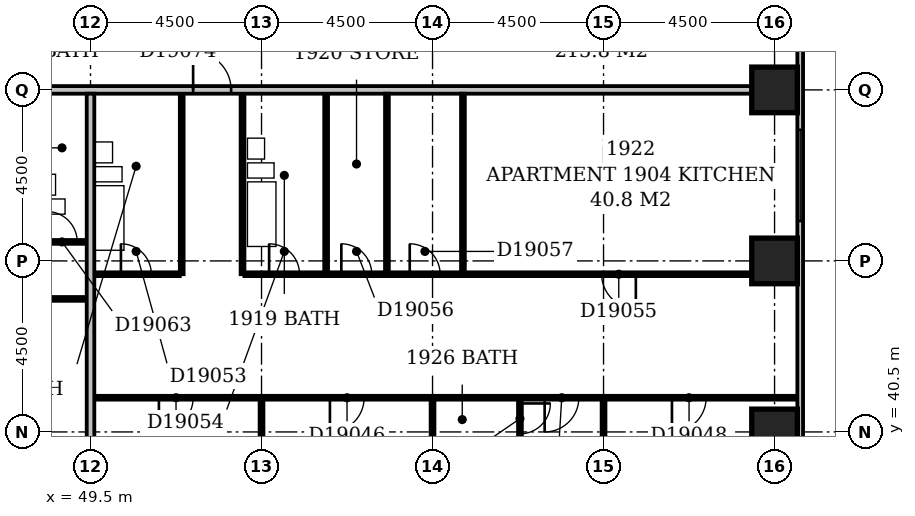
"""IFC4 building model, lengths in metres.
Left out: names, types, materials, properties, quantities, classifications, styles, units other than length and angle.
Written with IfcOpenShell. Run it as: python <this file> out.ifc"""

import sys

from ifc_helpers import new_model, si_unit, direction, frame, frame_2d, origin, origin_2d, place, context, subcontext, project, spatial, rectangle, extrude, element, fill, save


model = new_model("IFC4")
c1 = context("Model", 3, precision=1e-05, world=origin(), true_north=direction((0.0, 1.0)))
c2 = subcontext(c1, "Body", "Model", "MODEL_VIEW")
j1 = project(units=[si_unit("LENGTHUNIT", "METRE"), si_unit("PLANEANGLEUNIT", "RADIAN")], contexts=[c1])
p1 = place(None, origin())
s1 = spatial("IfcSite", under=j1, at=p1, CompositionType="ELEMENT")
p2 = place(p1, origin())
s2 = spatial("IfcBuilding", under=s1, at=p2, CompositionType="ELEMENT")
p3 = place(p2, frame((0.0, 0.0, 79.4)))
s3 = spatial("IfcBuildingStorey", under=s2, at=p3, CompositionType="ELEMENT", Elevation=79.4)
for number, where, z_axis, x_axis in (
    (1, (67.5, 40.5, -0.3), (0.0, 0.0, 1.0), (1.0, 0.0, 0.0)),
    (2, (67.5, 45.0, -0.3), (0.0, 0.0, 1.0), (1.0, 0.0, 0.0)),
    (3, (67.5, 49.5, -0.3), (0.0, 0.0, 1.0), (1.0, 0.0, 0.0)),
):
    element("IfcColumn", number, at=place(p3, frame(where, z_axis=z_axis, x_axis=x_axis)), inside=s3, PredefinedType="COLUMN", context=c2, shape_type="SweptSolid", body=[
        extrude(rectangle(XDim=1.2, YDim=1.2, at=origin_2d()), origin(), (0.0, 0.0, 1.0), 3.6),
    ])
p4 = place(p3, frame((68.175, 35.4, 0.0), z_axis=(0.0, 0.0, 1.0), x_axis=(0.0, 1.0, 0.0)))
e4 = element("IfcWall", 4, at=p4, inside=s3, PredefinedType="STANDARD", context=c2, shape_type="SweptSolid", body=[
    extrude(rectangle(XDim=23.85, YDim=0.15, at=frame_2d((11.925, 0.0))), origin(), (0.0, 0.0, 1.0), 2.7),
])
p5 = place(p4, frame((1.65, 0.0, 0.6)))
e5 = element("IfcOpeningElement", 5, at=p5, cuts=e4, PredefinedType="OPENING", context=c2, shape_type="SweptSolid", body=[
    extrude(rectangle(XDim=2.4, YDim=1.8, at=frame_2d((1.2, 0.9))), frame((0.0, 0.087, 0.0), z_axis=(0.0, -1.0, 0.0), x_axis=(1.0, 0.0, 0.0)), (0.0, 0.0, 1.0), 0.174),
])
p6 = place(p4, frame((10.65, 0.0, 0.6)))
e6 = element("IfcOpeningElement", 6, at=p6, cuts=e4, PredefinedType="OPENING", context=c2, shape_type="SweptSolid", body=[
    extrude(rectangle(XDim=2.4, YDim=1.8, at=frame_2d((1.2, 0.9))), frame((0.0, 0.087, 0.0), z_axis=(0.0, -1.0, 0.0), x_axis=(1.0, 0.0, 0.0)), (0.0, 0.0, 1.0), 0.174),
])
p7 = place(p4, frame((19.65, 0.0, 0.6)))
e7 = element("IfcOpeningElement", 7, at=p7, cuts=e4, PredefinedType="OPENING", context=c2, shape_type="SweptSolid", body=[
    extrude(rectangle(XDim=2.4, YDim=1.8, at=frame_2d((1.2, 0.9))), frame((0.0, 0.087, 0.0), z_axis=(0.0, -1.0, 0.0), x_axis=(1.0, 0.0, 0.0)), (0.0, 0.0, 1.0), 0.174),
])
p8 = place(p3, frame((49.5, 36.6, 0.0), z_axis=(0.0, 0.0, 1.0), x_axis=(0.0, 1.0, 0.0)))
e8 = element("IfcWall", 8, at=p8, inside=s3, PredefinedType="PARTITIONING", context=c2, shape_type="SweptSolid", body=[
    extrude(rectangle(XDim=12.8, YDim=0.2, at=frame_2d((6.4, 0.0))), origin(), (0.0, 0.0, 1.0), 3.3),
])
p9 = place(p3, frame((54.0, 36.6, 0.0), z_axis=(0.0, 0.0, 1.0), x_axis=(0.0, 1.0, 0.0)))
e9 = element("IfcWall", 9, at=p9, inside=s3, PredefinedType="PARTITIONING", context=c2, shape_type="SweptSolid", body=[
    extrude(rectangle(XDim=4.75, YDim=0.1, at=frame_2d((2.375, 0.0))), origin(), (0.0, 0.0, 1.0), 2.6),
])
p10 = place(p3, frame((58.5, 36.6, 0.0), z_axis=(0.0, 0.0, 1.0), x_axis=(0.0, 1.0, 0.0)))
e10 = element("IfcWall", 10, at=p10, inside=s3, PredefinedType="PARTITIONING", context=c2, shape_type="SweptSolid", body=[
    extrude(rectangle(XDim=4.75, YDim=0.1, at=frame_2d((2.375, 0.0))), origin(), (0.0, 0.0, 1.0), 3.3),
])
p11 = place(p3, frame((63.0, 36.6, 0.0), z_axis=(0.0, 0.0, 1.0), x_axis=(0.0, 1.0, 0.0)))
e11 = element("IfcWall", 11, at=p11, inside=s3, PredefinedType="PARTITIONING", context=c2, shape_type="SweptSolid", body=[
    extrude(rectangle(XDim=4.75, YDim=0.1, at=frame_2d((2.375, 0.0))), origin(), (0.0, 0.0, 1.0), 2.4),
])
p12 = place(p3, frame((60.8, 40.25, 0.0), z_axis=(0.0, 0.0, 1.0), x_axis=(0.0, 1.0, 0.0)))
e12 = element("IfcWall", 12, at=p12, inside=s3, PredefinedType="PLUMBINGWALL", context=c2, shape_type="SweptSolid", body=[
    extrude(rectangle(XDim=1.1, YDim=0.1, at=frame_2d((0.55, 0.0))), origin(), (0.0, 0.0, 1.0), 3.3),
])
p13 = place(p12, frame((0.2, 0.0, 0.0)))
e13 = element("IfcOpeningElement", 13, at=p13, cuts=e12, PredefinedType="OPENING", context=c2, shape_type="SweptSolid", body=[
    extrude(rectangle(XDim=0.8, YDim=2.1, at=frame_2d((0.4, 1.05))), frame((0.0, 0.062, 0.0), z_axis=(0.0, -1.0, 0.0), x_axis=(1.0, 0.0, 0.0)), (0.0, 0.0, 1.0), 0.124),
])
p14 = place(p3, frame((49.6, 41.4, 0.0), z_axis=(0.0, 0.0, 1.0), x_axis=(1.0, 0.0, 0.0)))
e14 = element("IfcWall", 14, at=p14, inside=s3, PredefinedType="PARTITIONING", context=c2, shape_type="SweptSolid", body=[
    extrude(rectangle(XDim=18.5, YDim=0.1, at=frame_2d((9.25, 0.0))), origin(), (0.0, 0.0, 1.0), 3.3),
])
p15 = place(p14, frame((1.7, 0.0, 0.0)))
e15 = element("IfcOpeningElement", 15, at=p15, cuts=e14, PredefinedType="OPENING", context=c2, shape_type="SweptSolid", body=[
    extrude(rectangle(XDim=0.9, YDim=2.1, at=frame_2d((0.45, 1.05))), frame((0.0, 0.062, 0.0), z_axis=(0.0, -1.0, 0.0), x_axis=(1.0, 0.0, 0.0)), (0.0, 0.0, 1.0), 0.124),
])
p16 = place(p14, frame((6.2, 0.0, 0.0)))
e16 = element("IfcOpeningElement", 16, at=p16, cuts=e14, PredefinedType="OPENING", context=c2, shape_type="SweptSolid", body=[
    extrude(rectangle(XDim=0.9, YDim=2.1, at=frame_2d((0.45, 1.05))), frame((0.0, 0.062, 0.0), z_axis=(0.0, -1.0, 0.0), x_axis=(1.0, 0.0, 0.0)), (0.0, 0.0, 1.0), 0.124),
])
p17 = place(p14, frame((11.85, 0.0, 0.0)))
e17 = element("IfcOpeningElement", 17, at=p17, cuts=e14, PredefinedType="OPENING", context=c2, shape_type="SweptSolid", body=[
    extrude(rectangle(XDim=0.9, YDim=2.1, at=frame_2d((0.45, 1.05))), frame((0.0, 0.062, 0.0), z_axis=(0.0, -1.0, 0.0), x_axis=(1.0, 0.0, 0.0)), (0.0, 0.0, 1.0), 0.124),
])
p18 = place(p14, frame((15.2, 0.0, 0.0)))
e18 = element("IfcOpeningElement", 18, at=p18, cuts=e14, PredefinedType="OPENING", context=c2, shape_type="SweptSolid", body=[
    extrude(rectangle(XDim=0.9, YDim=2.1, at=frame_2d((0.45, 1.05))), frame((0.0, 0.062, 0.0), z_axis=(0.0, -1.0, 0.0), x_axis=(1.0, 0.0, 0.0)), (0.0, 0.0, 1.0), 0.124),
])
p19 = place(p3, frame((36.1, 44.0, 0.0), z_axis=(0.0, 0.0, 1.0), x_axis=(1.0, 0.0, 0.0)))
e19 = element("IfcWall", 19, at=p19, inside=s3, PredefinedType="PARTITIONING", context=c2, shape_type="SweptSolid", body=[
    extrude(rectangle(XDim=13.3, YDim=0.1, at=frame_2d((6.65, 0.0))), origin(), (0.0, 0.0, 1.0), 3.3),
])
p20 = place(p19, frame((3.9, 0.0, 0.0)))
e20 = element("IfcOpeningElement", 20, at=p20, cuts=e19, PredefinedType="OPENING", context=c2, shape_type="SweptSolid", body=[
    extrude(rectangle(XDim=0.9, YDim=2.1, at=frame_2d((0.45, 1.05))), frame((0.0, 0.062, 0.0), z_axis=(0.0, -1.0, 0.0), x_axis=(1.0, 0.0, 0.0)), (0.0, 0.0, 1.0), 0.124),
])
p21 = place(p19, frame((10.7, 0.0, 0.0)))
e21 = element("IfcOpeningElement", 21, at=p21, cuts=e19, PredefinedType="OPENING", context=c2, shape_type="SweptSolid", body=[
    extrude(rectangle(XDim=0.9, YDim=2.1, at=frame_2d((0.45, 1.05))), frame((0.0, 0.062, 0.0), z_axis=(0.0, -1.0, 0.0), x_axis=(1.0, 0.0, 0.0)), (0.0, 0.0, 1.0), 0.124),
])
p22 = place(p3, frame((49.6, 44.65, 0.0), z_axis=(0.0, 0.0, 1.0), x_axis=(1.0, 0.0, 0.0)))
e22 = element("IfcWall", 22, at=p22, inside=s3, PredefinedType="PARTITIONING", context=c2, shape_type="SweptSolid", body=[
    extrude(rectangle(XDim=2.25, YDim=0.1, at=frame_2d((1.125, 0.0))), origin(), (0.0, 0.0, 1.0), 3.3),
])
p23 = place(p22, frame((0.7, 0.0, 0.0)))
e23 = element("IfcOpeningElement", 23, at=p23, cuts=e22, PredefinedType="OPENING", context=c2, shape_type="SweptSolid", body=[
    extrude(rectangle(XDim=0.8, YDim=2.1, at=frame_2d((0.4, 1.05))), frame((0.0, 0.062, 0.0), z_axis=(0.0, -1.0, 0.0), x_axis=(1.0, 0.0, 0.0)), (0.0, 0.0, 1.0), 0.124),
])
p24 = place(p3, frame((51.9, 44.65, 0.0), z_axis=(0.0, 0.0, 1.0), x_axis=(0.0, 1.0, 0.0)))
e24 = element("IfcWall", 24, at=p24, inside=s3, PredefinedType="PLUMBINGWALL", context=c2, shape_type="SweptSolid", body=[
    extrude(rectangle(XDim=4.75, YDim=0.1, at=frame_2d((2.375, 0.0))), origin(), (0.0, 0.0, 1.0), 3.3),
])
p25 = place(p3, frame((53.5, 44.65, 0.0), z_axis=(0.0, 0.0, 1.0), x_axis=(0.0, 1.0, 0.0)))
e25 = element("IfcWall", 25, at=p25, inside=s3, PredefinedType="PLUMBINGWALL", context=c2, shape_type="SweptSolid", body=[
    extrude(rectangle(XDim=4.75, YDim=0.1, at=frame_2d((2.375, 0.0))), origin(), (0.0, 0.0, 1.0), 2.6),
])
p26 = place(p3, frame((53.55, 44.65, 0.0), z_axis=(0.0, 0.0, 1.0), x_axis=(1.0, 0.0, 0.0)))
e26 = element("IfcWall", 26, at=p26, inside=s3, PredefinedType="PARTITIONING", context=c2, shape_type="SweptSolid", body=[
    extrude(rectangle(XDim=13.35, YDim=0.1, at=frame_2d((6.675, 0.0))), origin(), (0.0, 0.0, 1.0), 3.3),
])
p27 = place(p26, frame((0.65, 0.0, 0.0)))
e27 = element("IfcOpeningElement", 27, at=p27, cuts=e26, PredefinedType="OPENING", context=c2, shape_type="SweptSolid", body=[
    extrude(rectangle(XDim=0.8, YDim=2.1, at=frame_2d((0.4, 1.05))), frame((0.0, 0.062, 0.0), z_axis=(0.0, -1.0, 0.0), x_axis=(1.0, 0.0, 0.0)), (0.0, 0.0, 1.0), 0.124),
])
p28 = place(p26, frame((9.4, 0.0, 0.0)))
e28 = element("IfcOpeningElement", 28, at=p28, cuts=e26, PredefinedType="OPENING", context=c2, shape_type="SweptSolid", body=[
    extrude(rectangle(XDim=0.9, YDim=2.1, at=frame_2d((0.45, 1.05))), frame((0.0, 0.062, 0.0), z_axis=(0.0, -1.0, 0.0), x_axis=(1.0, 0.0, 0.0)), (0.0, 0.0, 1.0), 0.124),
])
p29 = place(p26, frame((2.55, 0.0, 0.0)))
e29 = element("IfcOpeningElement", 29, at=p29, cuts=e26, PredefinedType="OPENING", context=c2, shape_type="SweptSolid", body=[
    extrude(rectangle(XDim=0.8, YDim=2.1, at=frame_2d((0.4, 1.05))), frame((0.0, 0.062, 0.0), z_axis=(0.0, -1.0, 0.0), x_axis=(1.0, 0.0, 0.0)), (0.0, 0.0, 1.0), 0.124),
])
p30 = place(p26, frame((4.35, 0.0, 0.0)))
e30 = element("IfcOpeningElement", 30, at=p30, cuts=e26, PredefinedType="OPENING", context=c2, shape_type="SweptSolid", body=[
    extrude(rectangle(XDim=0.8, YDim=2.1, at=frame_2d((0.4, 1.05))), frame((0.0, 0.062, 0.0), z_axis=(0.0, -1.0, 0.0), x_axis=(1.0, 0.0, 0.0)), (0.0, 0.0, 1.0), 0.124),
])
p31 = place(p3, frame((55.7, 44.7, 0.0), z_axis=(0.0, 0.0, 1.0), x_axis=(0.0, 1.0, 0.0)))
e31 = element("IfcWall", 31, at=p31, inside=s3, PredefinedType="PLUMBINGWALL", context=c2, shape_type="SweptSolid", body=[
    extrude(rectangle(XDim=4.7, YDim=0.1, at=frame_2d((2.35, 0.0))), origin(), (0.0, 0.0, 1.0), 3.3),
])
for number, where, z_axis, x_axis in (
    (32, (57.3, 44.7, 0.0), (0.0, 0.0, 1.0), (0.0, 1.0, 0.0)),
    (33, (59.3, 44.7, 0.0), (0.0, 0.0, 1.0), (0.0, 1.0, 0.0)),
):
    element("IfcWall", number, at=place(p3, frame(where, z_axis=z_axis, x_axis=x_axis)), inside=s3, PredefinedType="PARTITIONING", context=c2, shape_type="SweptSolid", body=[
        extrude(rectangle(XDim=4.7, YDim=0.1, at=frame_2d((2.35, 0.0))), origin(), (0.0, 0.0, 1.0), 3.3),
    ])
p32 = place(p3, frame((37.65, 45.5, 0.0), z_axis=(0.0, 0.0, 1.0), x_axis=(1.0, 0.0, 0.0)))
e34 = element("IfcWall", 34, at=p32, inside=s3, PredefinedType="PARTITIONING", context=c2, shape_type="SweptSolid", body=[
    extrude(rectangle(XDim=11.75, YDim=0.1, at=frame_2d((5.875, 0.0))), origin(), (0.0, 0.0, 1.0), 3.3),
])
p33 = place(p32, frame((8.75, 0.0, 0.0)))
e35 = element("IfcOpeningElement", 35, at=p33, cuts=e34, PredefinedType="OPENING", context=c2, shape_type="SweptSolid", body=[
    extrude(rectangle(XDim=0.8, YDim=2.1, at=frame_2d((0.4, 1.05))), frame((0.0, 0.062, 0.0), z_axis=(0.0, -1.0, 0.0), x_axis=(1.0, 0.0, 0.0)), (0.0, 0.0, 1.0), 0.124),
])
p34 = place(p32, frame((3.5, 0.0, 0.0)))
e36 = element("IfcOpeningElement", 36, at=p34, cuts=e34, PredefinedType="OPENING", context=c2, shape_type="SweptSolid", body=[
    extrude(rectangle(XDim=0.9, YDim=2.1, at=frame_2d((0.45, 1.05))), frame((0.0, 0.062, 0.0), z_axis=(0.0, -1.0, 0.0), x_axis=(1.0, 0.0, 0.0)), (0.0, 0.0, 1.0), 0.124),
])
p35 = place(p32, frame((10.7, 0.0, 0.0)))
e37 = element("IfcOpeningElement", 37, at=p35, cuts=e34, PredefinedType="OPENING", context=c2, shape_type="SweptSolid", body=[
    extrude(rectangle(XDim=0.8, YDim=2.1, at=frame_2d((0.4, 1.05))), frame((0.0, 0.062, 0.0), z_axis=(0.0, -1.0, 0.0), x_axis=(1.0, 0.0, 0.0)), (0.0, 0.0, 1.0), 0.124),
])
p36 = place(p3, frame((9.1, 49.5, 0.0), z_axis=(0.0, 0.0, 1.0), x_axis=(1.0, 0.0, 0.0)))
e38 = element("IfcWall", 38, at=p36, inside=s3, PredefinedType="PARTITIONING", context=c2, shape_type="SweptSolid", body=[
    extrude(rectangle(XDim=57.8, YDim=0.2, at=frame_2d((28.9, 0.0))), origin(), (0.0, 0.0, 1.0), 3.3),
])
p37 = place(p36, frame((18.7, 0.0, 0.0)))
e39 = element("IfcOpeningElement", 39, at=p37, cuts=e38, PredefinedType="OPENING", context=c2, shape_type="SweptSolid", body=[
    extrude(rectangle(XDim=1.0, YDim=2.1, at=frame_2d((0.5, 1.05))), frame((0.0, 0.112, 0.0), z_axis=(0.0, -1.0, 0.0), x_axis=(1.0, 0.0, 0.0)), (0.0, 0.0, 1.0), 0.224),
])
p38 = place(p36, frame((24.35, 0.0, 0.0)))
e40 = element("IfcOpeningElement", 40, at=p38, cuts=e38, PredefinedType="OPENING", context=c2, shape_type="SweptSolid", body=[
    extrude(rectangle(XDim=1.0, YDim=2.1, at=frame_2d((0.5, 1.05))), frame((0.0, 0.112, 0.0), z_axis=(0.0, -1.0, 0.0), x_axis=(1.0, 0.0, 0.0)), (0.0, 0.0, 1.0), 0.224),
])
p39 = place(p36, frame((27.2, 0.0, 0.0)))
e41 = element("IfcOpeningElement", 41, at=p39, cuts=e38, PredefinedType="OPENING", context=c2, shape_type="SweptSolid", body=[
    extrude(rectangle(XDim=1.0, YDim=2.1, at=frame_2d((0.5, 1.05))), frame((0.0, 0.112, 0.0), z_axis=(0.0, -1.0, 0.0), x_axis=(1.0, 0.0, 0.0)), (0.0, 0.0, 1.0), 0.224),
])
p40 = place(p36, frame((43.1, 0.0, 0.0)))
e42 = element("IfcOpeningElement", 42, at=p40, cuts=e38, PredefinedType="OPENING", context=c2, shape_type="SweptSolid", body=[
    extrude(rectangle(XDim=1.0, YDim=2.1, at=frame_2d((0.5, 1.05))), frame((0.0, 0.112, 0.0), z_axis=(0.0, -1.0, 0.0), x_axis=(1.0, 0.0, 0.0)), (0.0, 0.0, 1.0), 0.224),
])
p41 = place(p36, frame((3.9, 0.0, 0.0)))
e43 = element("IfcOpeningElement", 43, at=p41, cuts=e38, PredefinedType="OPENING", context=c2, shape_type="SweptSolid", body=[
    extrude(rectangle(XDim=0.9, YDim=2.1, at=frame_2d((0.45, 1.05))), frame((0.0, 0.112, 0.0), z_axis=(0.0, -1.0, 0.0), x_axis=(1.0, 0.0, 0.0)), (0.0, 0.0, 1.0), 0.224),
])
p42 = place(p6, origin())
e44 = element("IfcWindow", 44, at=p42, inside=s3, PartitioningType="SINGLE_PANEL", PredefinedType="WINDOW", context=c2, shape_type="SweptSolid", body=[
    extrude(rectangle(XDim=2.4, YDim=1.8, at=frame_2d((1.2, 0.9))), frame((0.0, 0.03, 0.0), z_axis=(0.0, -1.0, 0.0), x_axis=(1.0, 0.0, 0.0)), (0.0, 0.0, 1.0), 0.06),
])
fill(e6, e44)
p43 = place(p13, origin())
e45 = element("IfcDoor", 45, at=p43, inside=s3, OperationType="SINGLE_SWING_RIGHT", PredefinedType="DOOR", context=c2, shape_type="SweptSolid", body=[
    extrude(rectangle(XDim=0.8, YDim=2.1, at=frame_2d((0.4, 1.05))), frame((0.0, 0.025, 0.0), z_axis=(0.0, -1.0, 0.0), x_axis=(1.0, 0.0, 0.0)), (0.0, 0.0, 1.0), 0.05),
])
fill(e13, e45)
p44 = place(p15, frame((0.9, 0.0, 0.0), z_axis=(0.0, 0.0, 1.0), x_axis=(-1.0, 0.0, 0.0)))
e46 = element("IfcDoor", 46, at=p44, inside=s3, OperationType="SINGLE_SWING_RIGHT", PredefinedType="DOOR", context=c2, shape_type="SweptSolid", body=[
    extrude(rectangle(XDim=0.9, YDim=2.1, at=frame_2d((0.45, 1.05))), frame((0.0, 0.025, 0.0), z_axis=(0.0, -1.0, 0.0), x_axis=(1.0, 0.0, 0.0)), (0.0, 0.0, 1.0), 0.05),
])
fill(e15, e46)
p45 = place(p16, frame((0.9, 0.0, 0.0), z_axis=(0.0, 0.0, 1.0), x_axis=(-1.0, 0.0, 0.0)))
e47 = element("IfcDoor", 47, at=p45, inside=s3, OperationType="SINGLE_SWING_RIGHT", PredefinedType="DOOR", context=c2, shape_type="SweptSolid", body=[
    extrude(rectangle(XDim=0.9, YDim=2.1, at=frame_2d((0.45, 1.05))), frame((0.0, 0.025, 0.0), z_axis=(0.0, -1.0, 0.0), x_axis=(1.0, 0.0, 0.0)), (0.0, 0.0, 1.0), 0.05),
])
fill(e16, e47)
p46 = place(p17, frame((0.9, 0.0, 0.0), z_axis=(0.0, 0.0, 1.0), x_axis=(-1.0, 0.0, 0.0)))
e48 = element("IfcDoor", 48, at=p46, inside=s3, OperationType="SINGLE_SWING_RIGHT", PredefinedType="DOOR", context=c2, shape_type="SweptSolid", body=[
    extrude(rectangle(XDim=0.9, YDim=2.1, at=frame_2d((0.45, 1.05))), frame((0.0, 0.025, 0.0), z_axis=(0.0, -1.0, 0.0), x_axis=(1.0, 0.0, 0.0)), (0.0, 0.0, 1.0), 0.05),
])
fill(e17, e48)
p47 = place(p18, frame((0.9, 0.0, 0.0), z_axis=(0.0, 0.0, 1.0), x_axis=(-1.0, 0.0, 0.0)))
e49 = element("IfcDoor", 49, at=p47, inside=s3, OperationType="SINGLE_SWING_RIGHT", PredefinedType="DOOR", context=c2, shape_type="SweptSolid", body=[
    extrude(rectangle(XDim=0.9, YDim=2.1, at=frame_2d((0.45, 1.05))), frame((0.0, 0.025, 0.0), z_axis=(0.0, -1.0, 0.0), x_axis=(1.0, 0.0, 0.0)), (0.0, 0.0, 1.0), 0.05),
])
fill(e18, e49)
p48 = place(p23, origin())
e50 = element("IfcDoor", 50, at=p48, inside=s3, OperationType="SINGLE_SWING_LEFT", PredefinedType="DOOR", context=c2, shape_type="SweptSolid", body=[
    extrude(rectangle(XDim=0.8, YDim=2.1, at=frame_2d((0.4, 1.05))), frame((0.0, 0.025, 0.0), z_axis=(0.0, -1.0, 0.0), x_axis=(1.0, 0.0, 0.0)), (0.0, 0.0, 1.0), 0.05),
])
fill(e23, e50)
p49 = place(p27, origin())
e51 = element("IfcDoor", 51, at=p49, inside=s3, OperationType="SINGLE_SWING_LEFT", PredefinedType="DOOR", context=c2, shape_type="SweptSolid", body=[
    extrude(rectangle(XDim=0.8, YDim=2.1, at=frame_2d((0.4, 1.05))), frame((0.0, 0.025, 0.0), z_axis=(0.0, -1.0, 0.0), x_axis=(1.0, 0.0, 0.0)), (0.0, 0.0, 1.0), 0.05),
])
fill(e27, e51)
p50 = place(p28, origin())
e52 = element("IfcDoor", 52, at=p50, inside=s3, OperationType="SINGLE_SWING_RIGHT", PredefinedType="DOOR", context=c2, shape_type="SweptSolid", body=[
    extrude(rectangle(XDim=0.9, YDim=2.1, at=frame_2d((0.45, 1.05))), frame((0.0, 0.025, 0.0), z_axis=(0.0, -1.0, 0.0), x_axis=(1.0, 0.0, 0.0)), (0.0, 0.0, 1.0), 0.05),
])
fill(e28, e52)
p51 = place(p29, origin())
e53 = element("IfcDoor", 53, at=p51, inside=s3, OperationType="SINGLE_SWING_LEFT", PredefinedType="DOOR", context=c2, shape_type="SweptSolid", body=[
    extrude(rectangle(XDim=0.8, YDim=2.1, at=frame_2d((0.4, 1.05))), frame((0.0, 0.025, 0.0), z_axis=(0.0, -1.0, 0.0), x_axis=(1.0, 0.0, 0.0)), (0.0, 0.0, 1.0), 0.05),
])
fill(e29, e53)
p52 = place(p30, origin())
e54 = element("IfcDoor", 54, at=p52, inside=s3, OperationType="SINGLE_SWING_LEFT", PredefinedType="DOOR", context=c2, shape_type="SweptSolid", body=[
    extrude(rectangle(XDim=0.8, YDim=2.1, at=frame_2d((0.4, 1.05))), frame((0.0, 0.025, 0.0), z_axis=(0.0, -1.0, 0.0), x_axis=(1.0, 0.0, 0.0)), (0.0, 0.0, 1.0), 0.05),
])
fill(e30, e54)
p53 = place(p35, origin())
e55 = element("IfcDoor", 55, at=p53, inside=s3, OperationType="SINGLE_SWING_LEFT", PredefinedType="DOOR", context=c2, shape_type="SweptSolid", body=[
    extrude(rectangle(XDim=0.8, YDim=2.1, at=frame_2d((0.4, 1.05))), frame((0.0, 0.025, 0.0), z_axis=(0.0, -1.0, 0.0), x_axis=(1.0, 0.0, 0.0)), (0.0, 0.0, 1.0), 0.05),
])
fill(e37, e55)
p54 = place(p40, origin())
e56 = element("IfcDoor", 56, at=p54, inside=s3, OperationType="SINGLE_SWING_LEFT", PredefinedType="DOOR", context=c2, shape_type="SweptSolid", body=[
    extrude(rectangle(XDim=1.0, YDim=2.1, at=frame_2d((0.5, 1.05))), frame((0.0, 0.025, 0.0), z_axis=(0.0, -1.0, 0.0), x_axis=(1.0, 0.0, 0.0)), (0.0, 0.0, 1.0), 0.05),
])
fill(e42, e56)
save(model, sys.argv[1])
